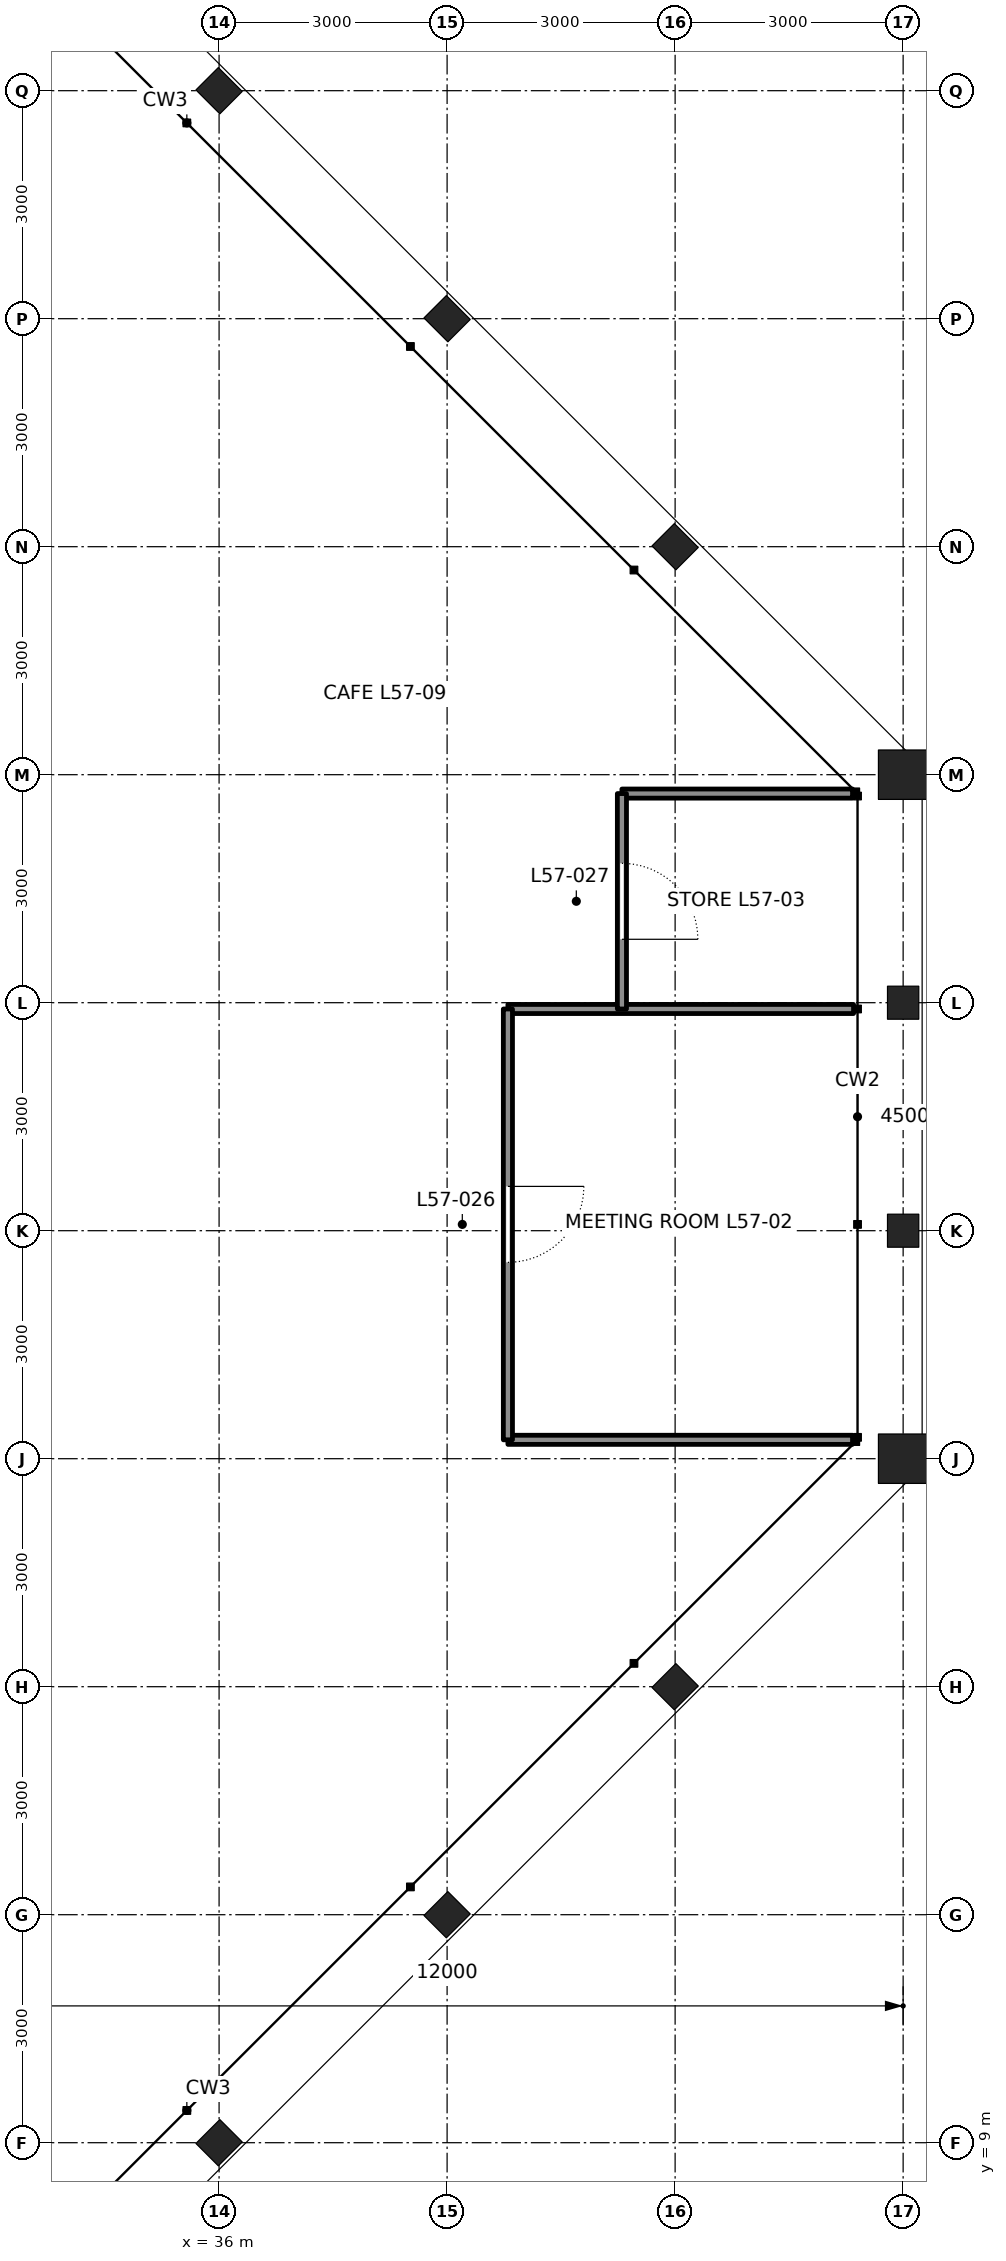
"""IFC4 building model, lengths in metres.
Left out: names, types, materials, properties, quantities, classifications, styles, units other than length and angle.
Written with IfcOpenShell. Run it as: python <this file> out.ifc"""

import sys

from ifc_helpers import new_model, si_unit, direction, frame, frame_2d, origin, origin_2d, place, context, subcontext, project, spatial, rectangle, hollow_rectangle, i_section, extrude, element, fill, save


model = new_model("IFC4")
c1 = context("Model", 3, precision=1e-05, world=origin(), true_north=direction((0.0, 1.0)))
c2 = subcontext(c1, "Body", "Model", "MODEL_VIEW")
j1 = project(units=[si_unit("LENGTHUNIT", "METRE"), si_unit("PLANEANGLEUNIT", "RADIAN")], contexts=[c1])
p1 = place(None, origin())
s1 = spatial("IfcSite", under=j1, at=p1, CompositionType="ELEMENT")
p2 = place(p1, origin())
s2 = spatial("IfcBuilding", under=s1, at=p2, CompositionType="ELEMENT")
p3 = place(p2, frame((0.0, 0.0, 257.7)))
s3 = spatial("IfcBuildingStorey", under=s2, at=p3, CompositionType="ELEMENT", Elevation=257.7)
for number, where, z_axis, x_axis in (
    (1, (36.0, 9.0, -0.91), (0.0, 0.0, 1.0), (0.707, -0.707, 0.0)),
    (2, (39.0, 12.0, -0.91), (0.0, 0.0, 1.0), (0.707, -0.707, 0.0)),
    (3, (42.0, 15.0, -0.91), (0.0, 0.0, 1.0), (0.707, -0.707, 0.0)),
):
    element("IfcColumn", number, at=place(p3, frame(where, z_axis=z_axis, x_axis=x_axis)), inside=s3, PredefinedType="COLUMN", context=c2, shape_type="SweptSolid", body=[
        extrude(i_section(OverallWidth=0.417, OverallDepth=0.445, WebThickness=0.039, FlangeThickness=0.063, at=origin_2d()), origin(), (0.0, 0.0, 1.0), 5.41),
    ])
p4 = place(p3, frame((45.0, 18.0, 0.0), z_axis=(0.0, 0.0, 1.0), x_axis=(1.0, 0.0, 0.0)))
e4 = element("IfcColumn", 4, at=p4, inside=s3, PredefinedType="COLUMN", context=c2, shape_type="SweptSolid", body=[
    extrude(hollow_rectangle(XDim=0.65, YDim=0.65, WallThickness=0.065, at=origin_2d()), origin(), (0.0, 0.0, 1.0), 4.5),
])
for number, where, z_axis, x_axis in (
    (5, (45.0, 21.0, 0.0), (0.0, 0.0, 1.0), (1.0, 0.0, 0.0)),
    (6, (45.0, 24.0, 0.0), (0.0, 0.0, 1.0), (1.0, 0.0, 0.0)),
):
    element("IfcColumn", number, at=place(p3, frame(where, z_axis=z_axis, x_axis=x_axis)), inside=s3, PredefinedType="COLUMN", context=c2, shape_type="SweptSolid", body=[
        extrude(i_section(OverallWidth=0.411, OverallDepth=0.434, WebThickness=0.036, FlangeThickness=0.057, at=origin_2d()), origin(), (0.0, 0.0, 1.0), 4.5),
    ])
p5 = place(p3, frame((45.0, 27.0, 0.0), z_axis=(0.0, 0.0, 1.0), x_axis=(1.0, 0.0, 0.0)))
e7 = element("IfcColumn", 7, at=p5, inside=s3, PredefinedType="COLUMN", context=c2, shape_type="SweptSolid", body=[
    extrude(hollow_rectangle(XDim=0.65, YDim=0.65, WallThickness=0.065, at=origin_2d()), origin(), (0.0, 0.0, 1.0), 4.5),
])
for number, where, z_axis, x_axis in (
    (8, (42.0, 30.0, 0.0), (0.0, 0.0, 1.0), (0.707, 0.707, 0.0)),
    (9, (39.0, 33.0, 0.0), (0.0, 0.0, 1.0), (0.707, 0.707, 0.0)),
    (10, (36.0, 36.0, 0.0), (0.0, 0.0, 1.0), (0.707, 0.707, 0.0)),
):
    element("IfcColumn", number, at=place(p3, frame(where, z_axis=z_axis, x_axis=x_axis)), inside=s3, PredefinedType="COLUMN", context=c2, shape_type="SweptSolid", body=[
        extrude(i_section(OverallWidth=0.417, OverallDepth=0.445, WebThickness=0.039, FlangeThickness=0.063, at=origin_2d()), origin(), (0.0, 0.0, 1.0), 4.5),
    ])
p6 = place(p3, frame((44.334, 18.249, 0.0), z_axis=(0.0, 0.0, 1.0), x_axis=(-1.0, 0.0, 0.0)))
e11 = element("IfcWall", 11, at=p6, inside=s3, PredefinedType="PARTITIONING", context=c2, shape_type="SweptSolid", body=[
    extrude(rectangle(XDim=4.534, YDim=0.12, at=frame_2d((2.267, 0.0))), origin(), (0.0, 0.0, 1.0), 4.34),
])
p7 = place(p3, frame((44.347, 23.917, 0.0), z_axis=(0.0, 0.0, 1.0), x_axis=(-1.0, 0.0, 0.0)))
e12 = element("IfcWall", 12, at=p7, inside=s3, PredefinedType="PARTITIONING", context=c2, shape_type="SweptSolid", body=[
    extrude(rectangle(XDim=4.547, YDim=0.12, at=frame_2d((2.274, 0.0))), origin(), (0.0, 0.0, 1.0), 3.647),
])
p8 = place(p3, frame((44.334, 26.751, 0.0), z_axis=(0.0, 0.0, 1.0), x_axis=(-1.0, 0.0, 0.0)))
e13 = element("IfcWall", 13, at=p8, inside=s3, PredefinedType="PARTITIONING", context=c2, shape_type="SweptSolid", body=[
    extrude(rectangle(XDim=3.034, YDim=0.12, at=frame_2d((1.517, 0.0))), origin(), (0.0, 0.0, 1.0), 4.34),
])
p9 = place(p3, frame((39.8, 18.249, 0.0), z_axis=(0.0, 0.0, 1.0), x_axis=(0.0, 1.0, 0.0)))
e14 = element("IfcWall", 14, at=p9, inside=s3, PredefinedType="PARTITIONING", context=c2, shape_type="SweptSolid", body=[
    extrude(rectangle(XDim=5.669, YDim=0.12, at=frame_2d((2.834, 0.0))), origin(), (0.0, 0.0, 1.0), 4.34),
])
p10 = place(p9, frame((2.334, 0.0, 0.0)))
e15 = element("IfcOpeningElement", 15, at=p10, cuts=e14, PredefinedType="OPENING", context=c2, shape_type="SweptSolid", body=[
    extrude(rectangle(XDim=1.0, YDim=2.4, at=frame_2d((0.5, 1.2))), frame((0.0, 0.07, 0.0), z_axis=(0.0, -1.0, 0.0), x_axis=(1.0, 0.0, 0.0)), (0.0, 0.0, 1.0), 0.14),
])
p11 = place(p3, frame((41.3, 23.917, 0.0), z_axis=(0.0, 0.0, 1.0), x_axis=(0.0, 1.0, 0.0)))
e16 = element("IfcWall", 16, at=p11, inside=s3, PredefinedType="PARTITIONING", context=c2, shape_type="SweptSolid", body=[
    extrude(rectangle(XDim=2.834, YDim=0.12, at=frame_2d((1.417, 0.0))), origin(), (0.0, 0.0, 1.0), 4.34),
])
p12 = place(p11, frame((0.917, 0.0, 0.0)))
e17 = element("IfcOpeningElement", 17, at=p12, cuts=e16, PredefinedType="OPENING", context=c2, shape_type="SweptSolid", body=[
    extrude(rectangle(XDim=1.0, YDim=2.4, at=frame_2d((0.5, 1.2))), frame((0.0, 0.07, 0.0), z_axis=(0.0, -1.0, 0.0), x_axis=(1.0, 0.0, 0.0)), (0.0, 0.0, 1.0), 0.14),
])
p13 = place(p10, frame((1.0, 0.0, 0.0), z_axis=(0.0, 0.0, 1.0), x_axis=(-1.0, 0.0, 0.0)))
e18 = element("IfcDoor", 18, at=p13, inside=s3, OperationType="SINGLE_SWING_LEFT", PredefinedType="DOOR", context=c2, shape_type="SweptSolid", body=[
    extrude(rectangle(XDim=1.0, YDim=2.4, at=frame_2d((0.5, 1.2))), frame((0.0, 0.025, 0.0), z_axis=(0.0, -1.0, 0.0), x_axis=(1.0, 0.0, 0.0)), (0.0, 0.0, 1.0), 0.05),
])
fill(e15, e18)
p14 = place(p12, frame((1.0, 0.0, 0.0), z_axis=(0.0, 0.0, 1.0), x_axis=(-1.0, 0.0, 0.0)))
e19 = element("IfcDoor", 19, at=p14, inside=s3, OperationType="SINGLE_SWING_RIGHT", PredefinedType="DOOR", context=c2, shape_type="SweptSolid", body=[
    extrude(rectangle(XDim=1.0, YDim=2.4, at=frame_2d((0.5, 1.2))), frame((0.0, 0.025, 0.0), z_axis=(0.0, -1.0, 0.0), x_axis=(1.0, 0.0, 0.0)), (0.0, 0.0, 1.0), 0.05),
])
fill(e17, e19)
save(model, sys.argv[1])
